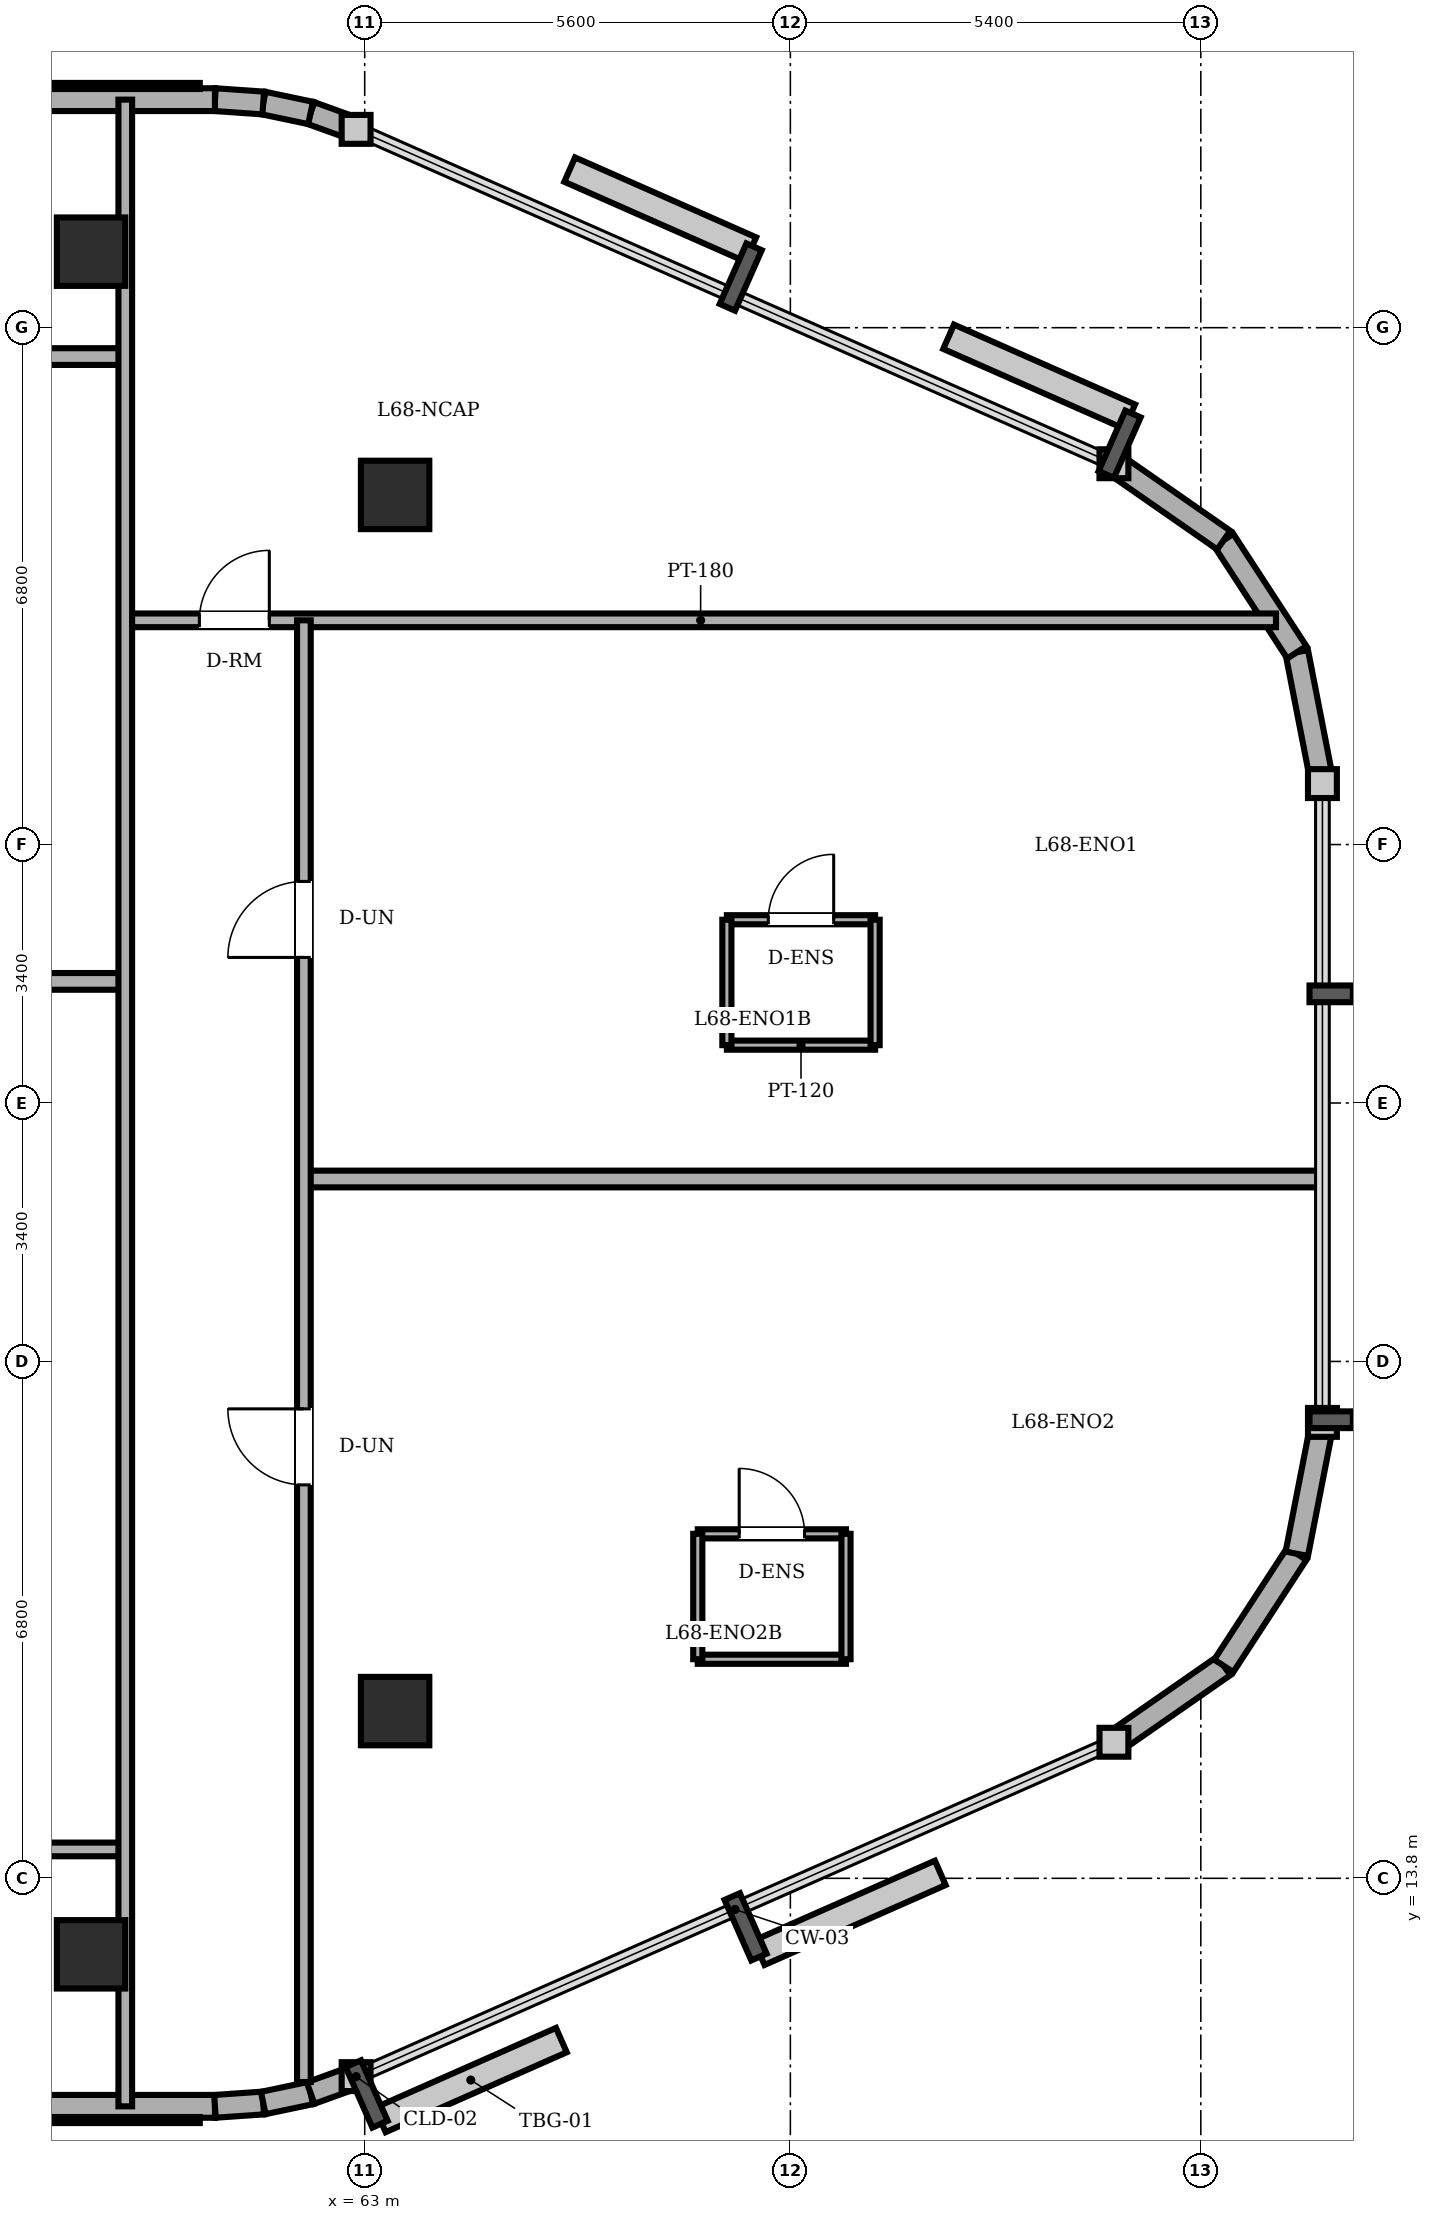
"""IFC4 building model, lengths in metres.
Left out: names, types, materials, properties, quantities, classifications, styles, units other than length and angle.
Written with IfcOpenShell. Run it as: python <this file> out.ifc"""

import sys

from ifc_helpers import new_model, si_unit, direction, frame, frame_2d, origin, origin_2d, place, context, subcontext, project, spatial, rectangle, circle, extrude, element, fill, save


model = new_model("IFC4")
c1 = context("Model", 3, precision=1e-05, world=origin(), true_north=direction((0.0, 1.0)))
c2 = subcontext(c1, "Body", "Model", "MODEL_VIEW")
j1 = project(units=[si_unit("LENGTHUNIT", "METRE"), si_unit("PLANEANGLEUNIT", "RADIAN")], contexts=[c1])
p1 = place(None, origin())
s1 = spatial("IfcSite", under=j1, at=p1, CompositionType="ELEMENT")
p2 = place(p1, origin())
s2 = spatial("IfcBuilding", under=s1, at=p2, CompositionType="ELEMENT")
p3 = place(p2, frame((0.0, 0.0, 262.45)))
s3 = spatial("IfcBuildingStorey", under=s2, at=p3, CompositionType="ELEMENT", Elevation=262.45)
for number, where, z_axis, x_axis in (
    (1, (59.4, 12.8, 0.0), (0.0, 0.0, 1.0), (1.0, 0.0, 0.0)),
    (2, (63.4, 16.0, 0.0), (0.0, 0.0, 1.0), (1.0, 0.0, 0.0)),
    (3, (63.4, 32.0, 0.0), (0.0, 0.0, 1.0), (1.0, 0.0, 0.0)),
    (4, (59.4, 35.2, 0.0), (0.0, 0.0, 1.0), (1.0, 0.0, 0.0)),
):
    element("IfcColumn", number, at=place(p3, frame(where, z_axis=z_axis, x_axis=x_axis)), inside=s3, PredefinedType="COLUMN", context=c2, shape_type="SweptSolid", body=[
        extrude(circle(Radius=0.45, at=origin_2d()), origin(), (0.0, 0.0, 1.0), 3.65),
    ])
p4 = place(p3, frame((24.0, 10.8, 0.0), z_axis=(0.0, 0.0, 1.0), x_axis=(1.0, 0.0, 0.0)))
e5 = element("IfcWall", 5, at=p4, inside=s3, PredefinedType="SOLIDWALL", context=c2, shape_type="SweptSolid", body=[
    extrude(rectangle(XDim=37.03, YDim=0.3, at=frame_2d((18.515, 0.0))), origin(), (0.0, 0.0, 1.0), 3.45),
])
p5 = place(p4, frame((6.725, 0.0, 0.0)))
e6 = element("IfcOpeningElement", 6, at=p5, cuts=e5, PredefinedType="OPENING", context=c2, shape_type="SweptSolid", body=[
    extrude(rectangle(XDim=0.95, YDim=2.2, at=frame_2d((0.475, 1.1))), frame((0.0, 0.16, 0.0), z_axis=(0.0, -1.0, 0.0), x_axis=(1.0, 0.0, 0.0)), (0.0, 0.0, 1.0), 0.32),
])
p6 = place(p4, frame((4.917, 0.0, 0.85)))
e7 = element("IfcOpeningElement", 7, at=p6, cuts=e5, PredefinedType="OPENING", context=c2, shape_type="SweptSolid", body=[
    extrude(rectangle(XDim=1.2, YDim=1.6, at=frame_2d((0.6, 0.8))), frame((0.0, 0.16, 0.0), z_axis=(0.0, -1.0, 0.0), x_axis=(1.0, 0.0, 0.0)), (0.0, 0.0, 1.0), 0.32),
])
p7 = place(p4, frame((10.083, 0.0, 0.85)))
e8 = element("IfcOpeningElement", 8, at=p7, cuts=e5, PredefinedType="OPENING", context=c2, shape_type="SweptSolid", body=[
    extrude(rectangle(XDim=1.2, YDim=1.6, at=frame_2d((0.6, 0.8))), frame((0.0, 0.16, 0.0), z_axis=(0.0, -1.0, 0.0), x_axis=(1.0, 0.0, 0.0)), (0.0, 0.0, 1.0), 0.32),
])
p8 = place(p4, frame((21.917, 0.0, 0.85)))
e9 = element("IfcOpeningElement", 9, at=p8, cuts=e5, PredefinedType="OPENING", context=c2, shape_type="SweptSolid", body=[
    extrude(rectangle(XDim=1.2, YDim=1.6, at=frame_2d((0.6, 0.8))), frame((0.0, 0.16, 0.0), z_axis=(0.0, -1.0, 0.0), x_axis=(1.0, 0.0, 0.0)), (0.0, 0.0, 1.0), 0.32),
])
p9 = place(p4, frame((28.583, 0.0, 0.85)))
e10 = element("IfcOpeningElement", 10, at=p9, cuts=e5, PredefinedType="OPENING", context=c2, shape_type="SweptSolid", body=[
    extrude(rectangle(XDim=1.2, YDim=1.6, at=frame_2d((0.6, 0.8))), frame((0.0, 0.16, 0.0), z_axis=(0.0, -1.0, 0.0), x_axis=(1.0, 0.0, 0.0)), (0.0, 0.0, 1.0), 0.32),
])
p10 = place(p3, frame((61.03, 10.8, 0.0), z_axis=(0.0, 0.0, 1.0), x_axis=(0.997613959688, 0.069039028352, 0.0)))
e11 = element("IfcWall", 11, at=p10, inside=s3, PredefinedType="SOLIDWALL", context=c2, shape_type="SweptSolid", body=[
    extrude(rectangle(XDim=0.636, YDim=0.3, at=frame_2d((0.318, 0.0))), origin(), (0.0, 0.0, 1.0), 3.45),
])
p11 = place(p3, frame((61.665, 10.844, 0.0), z_axis=(0.0, 0.0, 1.0), x_axis=(0.97857012251, 0.205913854149, 0.0)))
e12 = element("IfcWall", 12, at=p11, inside=s3, PredefinedType="SOLIDWALL", context=c2, shape_type="SweptSolid", body=[
    extrude(rectangle(XDim=0.637, YDim=0.3, at=frame_2d((0.318, 0.0))), origin(), (0.0, 0.0, 1.0), 3.45),
])
p12 = place(p3, frame((62.288, 10.975, 0.0), z_axis=(0.0, 0.0, 1.0), x_axis=(0.94077491148, 0.339031806665, 0.0)))
e13 = element("IfcWall", 13, at=p12, inside=s3, PredefinedType="SOLIDWALL", context=c2, shape_type="SweptSolid", body=[
    extrude(rectangle(XDim=0.636, YDim=0.3, at=frame_2d((0.318, 0.0))), origin(), (0.0, 0.0, 1.0), 3.45),
])
p13 = place(p3, frame((72.857, 15.59, 0.0), z_axis=(0.0, 0.0, 1.0), x_axis=(0.821006966142, 0.570918174124, 0.0)))
e14 = element("IfcWall", 14, at=p13, inside=s3, PredefinedType="SOLIDWALL", context=c2, shape_type="SweptSolid", body=[
    extrude(rectangle(XDim=1.76, YDim=0.3, at=frame_2d((0.88, 0.0))), origin(), (0.0, 0.0, 1.0), 3.45),
])
for number, where, z_axis, x_axis in (
    (15, (74.302, 16.595, 0.0), (0.0, 0.0, 1.0), (0.546, 0.838, 0.0)),
    (16, (75.263, 18.07, 0.0), (0.0, 0.0, 1.0), (0.192, 0.981, 0.0)),
    (17, (75.6, 28.202, 0.0), (0.0, 0.0, 1.0), (-0.192, 0.981, 0.0)),
    (18, (75.263, 29.93, 0.0), (0.0, 0.0, 1.0), (-0.546, 0.838, 0.0)),
):
    element("IfcWall", number, at=place(p3, frame(where, z_axis=z_axis, x_axis=x_axis)), inside=s3, PredefinedType="SOLIDWALL", context=c2, shape_type="SweptSolid", body=[
        extrude(rectangle(XDim=1.76, YDim=0.3, at=frame_2d((0.88, 0.0))), origin(), (0.0, 0.0, 1.0), 3.45),
    ])
p14 = place(p3, frame((74.302, 31.405, 0.0), z_axis=(0.0, 0.0, 1.0), x_axis=(-0.821006966142, 0.570918174124, 0.0)))
e19 = element("IfcWall", 19, at=p14, inside=s3, PredefinedType="SOLIDWALL", context=c2, shape_type="SweptSolid", body=[
    extrude(rectangle(XDim=1.76, YDim=0.3, at=frame_2d((0.88, 0.0))), origin(), (0.0, 0.0, 1.0), 3.45),
])
p15 = place(p3, frame((62.887, 36.809, 0.0), z_axis=(0.0, 0.0, 1.0), x_axis=(-0.94077491148, 0.339031806665, 0.0)))
e20 = element("IfcWall", 20, at=p15, inside=s3, PredefinedType="SOLIDWALL", context=c2, shape_type="SweptSolid", body=[
    extrude(rectangle(XDim=0.636, YDim=0.3, at=frame_2d((0.318, 0.0))), origin(), (0.0, 0.0, 1.0), 3.45),
])
p16 = place(p3, frame((62.288, 37.025, 0.0), z_axis=(0.0, 0.0, 1.0), x_axis=(-0.97857012251, 0.205913854149, 0.0)))
e21 = element("IfcWall", 21, at=p16, inside=s3, PredefinedType="SOLIDWALL", context=c2, shape_type="SweptSolid", body=[
    extrude(rectangle(XDim=0.637, YDim=0.3, at=frame_2d((0.318, 0.0))), origin(), (0.0, 0.0, 1.0), 3.45),
])
p17 = place(p3, frame((61.665, 37.156, 0.0), z_axis=(0.0, 0.0, 1.0), x_axis=(-0.997613959688, 0.069039028352, 0.0)))
e22 = element("IfcWall", 22, at=p17, inside=s3, PredefinedType="SOLIDWALL", context=c2, shape_type="SweptSolid", body=[
    extrude(rectangle(XDim=0.636, YDim=0.3, at=frame_2d((0.318, 0.0))), origin(), (0.0, 0.0, 1.0), 3.45),
])
p18 = place(p3, frame((61.03, 37.2, 0.0), z_axis=(0.0, 0.0, 1.0), x_axis=(-1.0, 0.0, 0.0)))
e23 = element("IfcWall", 23, at=p18, inside=s3, PredefinedType="SOLIDWALL", context=c2, shape_type="SweptSolid", body=[
    extrude(rectangle(XDim=37.03, YDim=0.3, at=frame_2d((18.515, 0.0))), origin(), (0.0, 0.0, 1.0), 3.45),
])
p19 = place(p18, frame((32.355, 0.0, 0.0)))
e24 = element("IfcOpeningElement", 24, at=p19, cuts=e23, PredefinedType="OPENING", context=c2, shape_type="SweptSolid", body=[
    extrude(rectangle(XDim=0.95, YDim=2.2, at=frame_2d((0.475, 1.1))), frame((0.0, 0.16, 0.0), z_axis=(0.0, -1.0, 0.0), x_axis=(1.0, 0.0, 0.0)), (0.0, 0.0, 1.0), 0.32),
])
p20 = place(p18, frame((7.247, 0.0, 0.85)))
e25 = element("IfcOpeningElement", 25, at=p20, cuts=e23, PredefinedType="OPENING", context=c2, shape_type="SweptSolid", body=[
    extrude(rectangle(XDim=1.2, YDim=1.6, at=frame_2d((0.6, 0.8))), frame((0.0, 0.16, 0.0), z_axis=(0.0, -1.0, 0.0), x_axis=(1.0, 0.0, 0.0)), (0.0, 0.0, 1.0), 0.32),
])
p21 = place(p18, frame((13.913, 0.0, 0.85)))
e26 = element("IfcOpeningElement", 26, at=p21, cuts=e23, PredefinedType="OPENING", context=c2, shape_type="SweptSolid", body=[
    extrude(rectangle(XDim=1.2, YDim=1.6, at=frame_2d((0.6, 0.8))), frame((0.0, 0.16, 0.0), z_axis=(0.0, -1.0, 0.0), x_axis=(1.0, 0.0, 0.0)), (0.0, 0.0, 1.0), 0.32),
])
p22 = place(p18, frame((25.747, 0.0, 0.85)))
e27 = element("IfcOpeningElement", 27, at=p22, cuts=e23, PredefinedType="OPENING", context=c2, shape_type="SweptSolid", body=[
    extrude(rectangle(XDim=1.2, YDim=1.6, at=frame_2d((0.6, 0.8))), frame((0.0, 0.16, 0.0), z_axis=(0.0, -1.0, 0.0), x_axis=(1.0, 0.0, 0.0)), (0.0, 0.0, 1.0), 0.32),
])
p23 = place(p3, frame((67.765, 26.411, 0.0), z_axis=(0.0, 0.0, 1.0), x_axis=(1.0, 0.0, 0.0)))
e28 = element("IfcWall", 28, at=p23, inside=s3, PredefinedType="PARTITIONING", context=c2, shape_type="SweptSolid", body=[
    extrude(rectangle(XDim=1.95, YDim=0.12, at=frame_2d((0.975, 0.0))), origin(), (0.0, 0.0, 1.0), 3.45),
])
p24 = place(p23, frame((0.545, 0.0, 0.0)))
e29 = element("IfcOpeningElement", 29, at=p24, cuts=e28, PredefinedType="OPENING", context=c2, shape_type="SweptSolid", body=[
    extrude(rectangle(XDim=0.86, YDim=2.1, at=frame_2d((0.43, 1.05))), frame((0.0, 0.07, 0.0), z_axis=(0.0, -1.0, 0.0), x_axis=(1.0, 0.0, 0.0)), (0.0, 0.0, 1.0), 0.14),
])
p25 = place(p3, frame((69.715, 24.761, 0.0), z_axis=(0.0, 0.0, 1.0), x_axis=(-1.0, 0.0, 0.0)))
e30 = element("IfcWall", 30, at=p25, inside=s3, PredefinedType="PARTITIONING", context=c2, shape_type="SweptSolid", body=[
    extrude(rectangle(XDim=1.95, YDim=0.12, at=frame_2d((0.975, 0.0))), origin(), (0.0, 0.0, 1.0), 3.45),
])
for number, where, z_axis, x_axis in (
    (31, (67.765, 26.411, 0.0), (0.0, 0.0, 1.0), (0.0, -1.0, 0.0)),
    (32, (69.715, 24.761, 0.0), (0.0, 0.0, 1.0), (0.0, 1.0, 0.0)),
):
    element("IfcWall", number, at=place(p3, frame(where, z_axis=z_axis, x_axis=x_axis)), inside=s3, PredefinedType="PARTITIONING", context=c2, shape_type="SweptSolid", body=[
        extrude(rectangle(XDim=1.65, YDim=0.12, at=frame_2d((0.825, 0.0))), origin(), (0.0, 0.0, 1.0), 3.45),
    ])
p26 = place(p3, frame((67.382, 18.332, 0.0), z_axis=(0.0, 0.0, 1.0), x_axis=(1.0, 0.0, 0.0)))
e33 = element("IfcWall", 33, at=p26, inside=s3, PredefinedType="PARTITIONING", context=c2, shape_type="SweptSolid", body=[
    extrude(rectangle(XDim=1.95, YDim=0.12, at=frame_2d((0.975, 0.0))), origin(), (0.0, 0.0, 1.0), 3.45),
])
p27 = place(p26, frame((0.545, 0.0, 0.0)))
e34 = element("IfcOpeningElement", 34, at=p27, cuts=e33, PredefinedType="OPENING", context=c2, shape_type="SweptSolid", body=[
    extrude(rectangle(XDim=0.86, YDim=2.1, at=frame_2d((0.43, 1.05))), frame((0.0, 0.07, 0.0), z_axis=(0.0, -1.0, 0.0), x_axis=(1.0, 0.0, 0.0)), (0.0, 0.0, 1.0), 0.14),
])
p28 = place(p3, frame((69.332, 16.682, 0.0), z_axis=(0.0, 0.0, 1.0), x_axis=(-1.0, 0.0, 0.0)))
e35 = element("IfcWall", 35, at=p28, inside=s3, PredefinedType="PARTITIONING", context=c2, shape_type="SweptSolid", body=[
    extrude(rectangle(XDim=1.95, YDim=0.12, at=frame_2d((0.975, 0.0))), origin(), (0.0, 0.0, 1.0), 3.45),
])
for number, where, z_axis, x_axis in (
    (36, (67.382, 18.332, 0.0), (0.0, 0.0, 1.0), (0.0, -1.0, 0.0)),
    (37, (69.332, 16.682, 0.0), (0.0, 0.0, 1.0), (0.0, 1.0, 0.0)),
):
    element("IfcWall", number, at=place(p3, frame(where, z_axis=z_axis, x_axis=x_axis)), inside=s3, PredefinedType="PARTITIONING", context=c2, shape_type="SweptSolid", body=[
        extrude(rectangle(XDim=1.65, YDim=0.12, at=frame_2d((0.825, 0.0))), origin(), (0.0, 0.0, 1.0), 3.45),
    ])
p29 = place(p3, frame((39.85, 14.18, 0.0), z_axis=(0.0, 0.0, 1.0), x_axis=(1.0, 0.0, 0.0)))
e38 = element("IfcWall", 38, at=p29, inside=s3, PredefinedType="PARTITIONING", context=c2, shape_type="SweptSolid", body=[
    extrude(rectangle(XDim=20.0, YDim=0.18, at=frame_2d((10.0, 0.0))), origin(), (0.0, 0.0, 1.0), 3.092),
])
p30 = place(p29, frame((9.54, 0.0, 0.0)))
e39 = element("IfcOpeningElement", 39, at=p30, cuts=e38, PredefinedType="OPENING", context=c2, shape_type="SweptSolid", body=[
    extrude(rectangle(XDim=0.92, YDim=2.1, at=frame_2d((0.46, 1.05))), frame((0.0, 0.1, 0.0), z_axis=(0.0, -1.0, 0.0), x_axis=(1.0, 0.0, 0.0)), (0.0, 0.0, 1.0), 0.2),
])
p31 = place(p3, frame((62.2, 23.0, 0.0), z_axis=(0.0, 0.0, 1.0), x_axis=(1.0, 0.0, 0.0)))
e40 = element("IfcWall", 40, at=p31, inside=s3, PredefinedType="PARTITIONING", context=c2, shape_type="SweptSolid", body=[
    extrude(rectangle(XDim=13.4, YDim=0.22, at=frame_2d((6.7, 0.0))), origin(), (0.0, 0.0, 1.0), 3.45),
])
p32 = place(p3, frame((39.85, 25.6, 0.0), z_axis=(0.0, 0.0, 1.0), x_axis=(1.0, 0.0, 0.0)))
e41 = element("IfcWall", 41, at=p32, inside=s3, PredefinedType="PARTITIONING", context=c2, shape_type="SweptSolid", body=[
    extrude(rectangle(XDim=20.0, YDim=0.22, at=frame_2d((10.0, 0.0))), origin(), (0.0, 0.0, 1.0), 3.45),
])
p33 = place(p3, frame((59.85, 30.35, 0.0), z_axis=(0.0, 0.0, 1.0), x_axis=(1.0, 0.0, 0.0)))
e42 = element("IfcWall", 42, at=p33, inside=s3, PredefinedType="PARTITIONING", context=c2, shape_type="SweptSolid", body=[
    extrude(rectangle(XDim=15.139, YDim=0.18, at=frame_2d((7.569, 0.0))), origin(), (0.0, 0.0, 1.0), 3.45),
])
p34 = place(p33, frame((0.975, 0.0, 0.0)))
e43 = element("IfcOpeningElement", 43, at=p34, cuts=e42, PredefinedType="OPENING", context=c2, shape_type="SweptSolid", body=[
    extrude(rectangle(XDim=0.92, YDim=2.1, at=frame_2d((0.46, 1.05))), frame((0.0, 0.1, 0.0), z_axis=(0.0, -1.0, 0.0), x_axis=(1.0, 0.0, 0.0)), (0.0, 0.0, 1.0), 0.2),
])
p35 = place(p3, frame((39.85, 33.82, 0.0), z_axis=(0.0, 0.0, 1.0), x_axis=(1.0, 0.0, 0.0)))
e44 = element("IfcWall", 44, at=p35, inside=s3, PredefinedType="PARTITIONING", context=c2, shape_type="SweptSolid", body=[
    extrude(rectangle(XDim=20.0, YDim=0.22, at=frame_2d((10.0, 0.0))), origin(), (0.0, 0.0, 1.0), 3.092),
])
p36 = place(p3, frame((59.85, 10.8, 0.0), z_axis=(0.0, 0.0, 1.0), x_axis=(0.0, 1.0, 0.0)))
e45 = element("IfcWall", 45, at=p36, inside=s3, PredefinedType="PARTITIONING", context=c2, shape_type="SweptSolid", body=[
    extrude(rectangle(XDim=26.4, YDim=0.18, at=frame_2d((13.2, 0.0))), origin(), (0.0, 0.0, 1.0), 3.45),
])
p37 = place(p3, frame((62.2, 11.12, 0.0), z_axis=(0.0, 0.0, 1.0), x_axis=(0.0, 1.0, 0.0)))
e46 = element("IfcWall", 46, at=p37, inside=s3, PredefinedType="PARTITIONING", context=c2, shape_type="SweptSolid", body=[
    extrude(rectangle(XDim=19.23, YDim=0.18, at=frame_2d((9.615, 0.0))), origin(), (0.0, 0.0, 1.0), 3.45),
])
p38 = place(p37, frame((14.795, 0.0, 0.0)))
e47 = element("IfcOpeningElement", 47, at=p38, cuts=e46, PredefinedType="OPENING", context=c2, shape_type="SweptSolid", body=[
    extrude(rectangle(XDim=1.0, YDim=2.15, at=frame_2d((0.5, 1.075))), frame((0.0, 0.1, 0.0), z_axis=(0.0, -1.0, 0.0), x_axis=(1.0, 0.0, 0.0)), (0.0, 0.0, 1.0), 0.2),
])
p39 = place(p37, frame((7.856, 0.0, 0.0)))
e48 = element("IfcOpeningElement", 48, at=p39, cuts=e46, PredefinedType="OPENING", context=c2, shape_type="SweptSolid", body=[
    extrude(rectangle(XDim=1.0, YDim=2.15, at=frame_2d((0.5, 1.075))), frame((0.0, 0.1, 0.0), z_axis=(0.0, -1.0, 0.0), x_axis=(1.0, 0.0, 0.0)), (0.0, 0.0, 1.0), 0.2),
])
p40 = place(p24, origin())
e49 = element("IfcDoor", 49, at=p40, inside=s3, OperationType="SINGLE_SWING_RIGHT", PredefinedType="DOOR", context=c2, shape_type="SweptSolid", body=[
    extrude(rectangle(XDim=0.86, YDim=2.1, at=frame_2d((0.43, 1.05))), frame((0.0, 0.025, 0.0), z_axis=(0.0, -1.0, 0.0), x_axis=(1.0, 0.0, 0.0)), (0.0, 0.0, 1.0), 0.05),
])
fill(e29, e49)
p41 = place(p27, origin())
e50 = element("IfcDoor", 50, at=p41, inside=s3, OperationType="SINGLE_SWING_LEFT", PredefinedType="DOOR", context=c2, shape_type="SweptSolid", body=[
    extrude(rectangle(XDim=0.86, YDim=2.1, at=frame_2d((0.43, 1.05))), frame((0.0, 0.025, 0.0), z_axis=(0.0, -1.0, 0.0), x_axis=(1.0, 0.0, 0.0)), (0.0, 0.0, 1.0), 0.05),
])
fill(e34, e50)
p42 = place(p34, origin())
e51 = element("IfcDoor", 51, at=p42, inside=s3, OperationType="SINGLE_SWING_RIGHT", PredefinedType="DOOR", context=c2, shape_type="SweptSolid", body=[
    extrude(rectangle(XDim=0.92, YDim=2.1, at=frame_2d((0.46, 1.05))), frame((0.0, 0.025, 0.0), z_axis=(0.0, -1.0, 0.0), x_axis=(1.0, 0.0, 0.0)), (0.0, 0.0, 1.0), 0.05),
])
fill(e43, e51)
p43 = place(p38, origin())
e52 = element("IfcDoor", 52, at=p43, inside=s3, OperationType="SINGLE_SWING_LEFT", PredefinedType="DOOR", context=c2, shape_type="SweptSolid", body=[
    extrude(rectangle(XDim=1.0, YDim=2.15, at=frame_2d((0.5, 1.075))), frame((0.0, 0.025, 0.0), z_axis=(0.0, -1.0, 0.0), x_axis=(1.0, 0.0, 0.0)), (0.0, 0.0, 1.0), 0.05),
])
fill(e47, e52)
p44 = place(p39, origin())
e53 = element("IfcDoor", 53, at=p44, inside=s3, OperationType="SINGLE_SWING_RIGHT", PredefinedType="DOOR", context=c2, shape_type="SweptSolid", body=[
    extrude(rectangle(XDim=1.0, YDim=2.15, at=frame_2d((0.5, 1.075))), frame((0.0, 0.025, 0.0), z_axis=(0.0, -1.0, 0.0), x_axis=(1.0, 0.0, 0.0)), (0.0, 0.0, 1.0), 0.05),
])
fill(e48, e53)
save(model, sys.argv[1])
